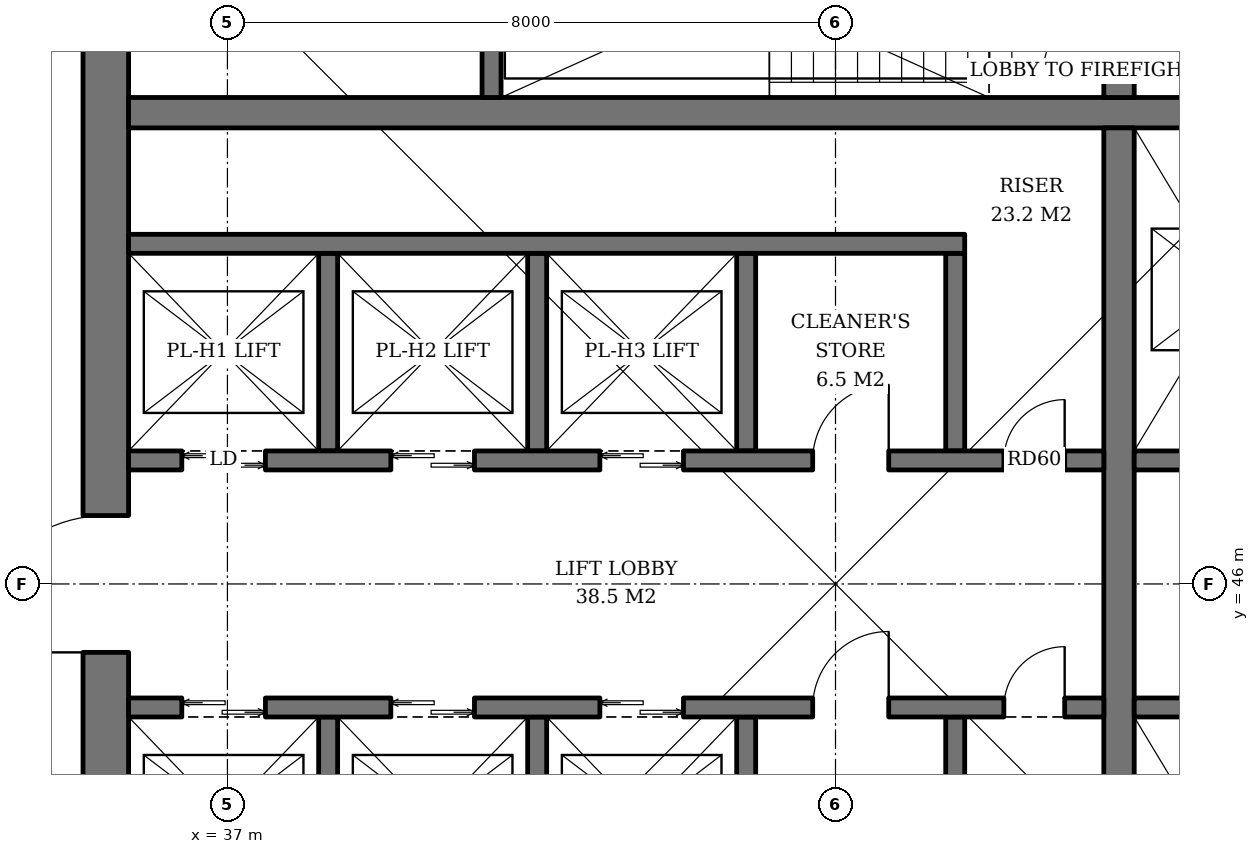
"""IFC4 building model, lengths in metres.
Left out: names, types, materials, properties, quantities, classifications, styles, units other than length and angle.
Written with IfcOpenShell. Run it as: python <this file> out.ifc"""

import sys

from ifc_helpers import new_model, si_unit, direction, frame, frame_2d, origin, place, context, subcontext, project, spatial, rectangle, extrude, element, fill, save


model = new_model("IFC4")
c1 = context("Model", 3, precision=1e-05, world=origin(), true_north=direction((0.0, 1.0)))
c2 = subcontext(c1, "Body", "Model", "MODEL_VIEW")
j1 = project(units=[si_unit("LENGTHUNIT", "METRE"), si_unit("PLANEANGLEUNIT", "RADIAN")], contexts=[c1])
p1 = place(None, origin())
s1 = spatial("IfcSite", under=j1, at=p1, CompositionType="ELEMENT")
p2 = place(p1, origin())
s2 = spatial("IfcBuilding", under=s1, at=p2, CompositionType="ELEMENT")
p3 = place(p2, frame((0.0, 0.0, 165.4)))
s3 = spatial("IfcBuildingStorey", under=s2, at=p3, CompositionType="ELEMENT", Elevation=165.4)
p4 = place(p3, frame((35.4, 36.7, 0.0), z_axis=(0.0, 0.0, 1.0), x_axis=(0.0, 1.0, 0.0)))
e1 = element("IfcWall", 1, at=p4, inside=s3, PredefinedType="SHEAR", context=c2, shape_type="SweptSolid", body=[
    extrude(rectangle(XDim=18.6, YDim=0.6, at=frame_2d((9.3, 0.0))), origin(), (0.0, 0.0, 1.0), 3.8),
])
p5 = place(p4, frame((8.4, 0.0, 0.0)))
e2 = element("IfcOpeningElement", 2, at=p5, cuts=e1, PredefinedType="OPENING", context=c2, shape_type="SweptSolid", body=[
    extrude(rectangle(XDim=1.8, YDim=2.4, at=frame_2d((0.9, 1.2))), frame((0.0, 0.31, 0.0), z_axis=(0.0, -1.0, 0.0), x_axis=(1.0, 0.0, 0.0)), (0.0, 0.0, 1.0), 0.62),
])
p6 = place(p3, frame((35.7, 52.2, 0.0), z_axis=(0.0, 0.0, 1.0), x_axis=(1.0, 0.0, 0.0)))
e3 = element("IfcWall", 3, at=p6, inside=s3, PredefinedType="SHEAR", context=c2, shape_type="SweptSolid", body=[
    extrude(rectangle(XDim=18.6, YDim=0.4, at=frame_2d((9.3, 0.0))), origin(), (0.0, 0.0, 1.0), 3.8),
])
p7 = place(p3, frame((48.73, 40.0, 0.0), z_axis=(0.0, 0.0, 1.0), x_axis=(0.0, 1.0, 0.0)))
e4 = element("IfcWall", 4, at=p7, inside=s3, PredefinedType="SHEAR", context=c2, shape_type="SweptSolid", body=[
    extrude(rectangle(XDim=12.0, YDim=0.4, at=frame_2d((6.0, 0.0))), origin(), (0.0, 0.0, 1.0), 3.8),
])
p8 = place(p3, frame((48.73, 52.4, 0.0), z_axis=(0.0, 0.0, 1.0), x_axis=(0.0, 1.0, 0.0)))
e5 = element("IfcWall", 5, at=p8, inside=s3, PredefinedType="SHEAR", context=c2, shape_type="SweptSolid", body=[
    extrude(rectangle(XDim=2.9, YDim=0.4, at=frame_2d((1.45, 0.0))), origin(), (0.0, 0.0, 1.0), 3.8),
])
p9 = place(p8, frame((0.3, 0.0, 0.0)))
e6 = element("IfcOpeningElement", 6, at=p9, cuts=e5, PredefinedType="OPENING", context=c2, shape_type="SweptSolid", body=[
    extrude(rectangle(XDim=1.0, YDim=2.1, at=frame_2d((0.5, 1.05))), frame((0.0, 0.21, 0.0), z_axis=(0.0, -1.0, 0.0), x_axis=(1.0, 0.0, 0.0)), (0.0, 0.0, 1.0), 0.42),
])
p10 = place(p3, frame((40.475, 52.4, 0.0), z_axis=(0.0, 0.0, 1.0), x_axis=(0.0, 1.0, 0.0)))
e7 = element("IfcWall", 7, at=p10, inside=s3, PredefinedType="SHEAR", context=c2, shape_type="SweptSolid", body=[
    extrude(rectangle(XDim=2.9, YDim=0.25, at=frame_2d((1.45, 0.0))), origin(), (0.0, 0.0, 1.0), 3.8),
])
for number, where, z_axis, x_axis in (
    (8, (38.325, 47.75, 0.0), (0.0, 0.0, 1.0), (0.0, 1.0, 0.0)),
    (9, (41.075, 47.75, 0.0), (0.0, 0.0, 1.0), (0.0, 1.0, 0.0)),
    (10, (43.825, 47.75, 0.0), (0.0, 0.0, 1.0), (0.0, 1.0, 0.0)),
    (11, (46.575, 47.75, 0.0), (0.0, 0.0, 1.0), (0.0, 1.0, 0.0)),
):
    element("IfcWall", number, at=place(p3, frame(where, z_axis=z_axis, x_axis=x_axis)), inside=s3, PredefinedType="SHEAR", context=c2, shape_type="SweptSolid", body=[
        extrude(rectangle(XDim=2.6, YDim=0.25, at=frame_2d((1.3, 0.0))), origin(), (0.0, 0.0, 1.0), 3.8),
    ])
p11 = place(p3, frame((35.7, 50.475, 0.0), z_axis=(0.0, 0.0, 1.0), x_axis=(1.0, 0.0, 0.0)))
e12 = element("IfcWall", 12, at=p11, inside=s3, PredefinedType="SHEAR", context=c2, shape_type="SweptSolid", body=[
    extrude(rectangle(XDim=11.0, YDim=0.25, at=frame_2d((5.5, 0.0))), origin(), (0.0, 0.0, 1.0), 3.8),
])
p12 = place(p3, frame((35.7, 47.625, 0.0), z_axis=(0.0, 0.0, 1.0), x_axis=(1.0, 0.0, 0.0)))
e13 = element("IfcWall", 13, at=p12, inside=s3, PredefinedType="SHEAR", context=c2, shape_type="SweptSolid", body=[
    extrude(rectangle(XDim=12.83, YDim=0.25, at=frame_2d((6.415, 0.0))), origin(), (0.0, 0.0, 1.0), 3.8),
])
p13 = place(p12, frame((0.7, 0.0, 0.0)))
e14 = element("IfcOpeningElement", 14, at=p13, cuts=e13, PredefinedType="OPENING", context=c2, shape_type="SweptSolid", body=[
    extrude(rectangle(XDim=1.1, YDim=2.2, at=frame_2d((0.55, 1.1))), frame((0.0, 0.135, 0.0), z_axis=(0.0, -1.0, 0.0), x_axis=(1.0, 0.0, 0.0)), (0.0, 0.0, 1.0), 0.27),
])
p14 = place(p12, frame((3.45, 0.0, 0.0)))
e15 = element("IfcOpeningElement", 15, at=p14, cuts=e13, PredefinedType="OPENING", context=c2, shape_type="SweptSolid", body=[
    extrude(rectangle(XDim=1.1, YDim=2.2, at=frame_2d((0.55, 1.1))), frame((0.0, 0.135, 0.0), z_axis=(0.0, -1.0, 0.0), x_axis=(1.0, 0.0, 0.0)), (0.0, 0.0, 1.0), 0.27),
])
p15 = place(p12, frame((6.2, 0.0, 0.0)))
e16 = element("IfcOpeningElement", 16, at=p15, cuts=e13, PredefinedType="OPENING", context=c2, shape_type="SweptSolid", body=[
    extrude(rectangle(XDim=1.1, YDim=2.2, at=frame_2d((0.55, 1.1))), frame((0.0, 0.135, 0.0), z_axis=(0.0, -1.0, 0.0), x_axis=(1.0, 0.0, 0.0)), (0.0, 0.0, 1.0), 0.27),
])
p16 = place(p12, frame((9.0, 0.0, 0.0)))
e17 = element("IfcOpeningElement", 17, at=p16, cuts=e13, PredefinedType="OPENING", context=c2, shape_type="SweptSolid", body=[
    extrude(rectangle(XDim=1.0, YDim=2.1, at=frame_2d((0.5, 1.05))), frame((0.0, 0.135, 0.0), z_axis=(0.0, -1.0, 0.0), x_axis=(1.0, 0.0, 0.0)), (0.0, 0.0, 1.0), 0.27),
])
p17 = place(p12, frame((11.515, 0.0, 0.0)))
e18 = element("IfcOpeningElement", 18, at=p17, cuts=e13, PredefinedType="OPENING", context=c2, shape_type="SweptSolid", body=[
    extrude(rectangle(XDim=0.8, YDim=2.0, at=frame_2d((0.4, 1.0))), frame((0.0, 0.135, 0.0), z_axis=(0.0, -1.0, 0.0), x_axis=(1.0, 0.0, 0.0)), (0.0, 0.0, 1.0), 0.27),
])
for number, where, z_axis, x_axis in (
    (19, (38.325, 44.25, 0.0), (0.0, 0.0, 1.0), (0.0, -1.0, 0.0)),
    (20, (41.075, 44.25, 0.0), (0.0, 0.0, 1.0), (0.0, -1.0, 0.0)),
    (21, (43.825, 44.25, 0.0), (0.0, 0.0, 1.0), (0.0, -1.0, 0.0)),
    (22, (46.575, 44.25, 0.0), (0.0, 0.0, 1.0), (0.0, -1.0, 0.0)),
):
    element("IfcWall", number, at=place(p3, frame(where, z_axis=z_axis, x_axis=x_axis)), inside=s3, PredefinedType="SHEAR", context=c2, shape_type="SweptSolid", body=[
        extrude(rectangle(XDim=2.6, YDim=0.25, at=frame_2d((1.3, 0.0))), origin(), (0.0, 0.0, 1.0), 3.8),
    ])
p18 = place(p3, frame((35.7, 44.375, 0.0), z_axis=(0.0, 0.0, 1.0), x_axis=(1.0, 0.0, 0.0)))
e23 = element("IfcWall", 23, at=p18, inside=s3, PredefinedType="SHEAR", context=c2, shape_type="SweptSolid", body=[
    extrude(rectangle(XDim=12.83, YDim=0.25, at=frame_2d((6.415, 0.0))), origin(), (0.0, 0.0, 1.0), 3.8),
])
p19 = place(p18, frame((0.7, 0.0, 0.0)))
e24 = element("IfcOpeningElement", 24, at=p19, cuts=e23, PredefinedType="OPENING", context=c2, shape_type="SweptSolid", body=[
    extrude(rectangle(XDim=1.1, YDim=2.2, at=frame_2d((0.55, 1.1))), frame((0.0, 0.135, 0.0), z_axis=(0.0, -1.0, 0.0), x_axis=(1.0, 0.0, 0.0)), (0.0, 0.0, 1.0), 0.27),
])
p20 = place(p18, frame((3.45, 0.0, 0.0)))
e25 = element("IfcOpeningElement", 25, at=p20, cuts=e23, PredefinedType="OPENING", context=c2, shape_type="SweptSolid", body=[
    extrude(rectangle(XDim=1.1, YDim=2.2, at=frame_2d((0.55, 1.1))), frame((0.0, 0.135, 0.0), z_axis=(0.0, -1.0, 0.0), x_axis=(1.0, 0.0, 0.0)), (0.0, 0.0, 1.0), 0.27),
])
p21 = place(p18, frame((6.2, 0.0, 0.0)))
e26 = element("IfcOpeningElement", 26, at=p21, cuts=e23, PredefinedType="OPENING", context=c2, shape_type="SweptSolid", body=[
    extrude(rectangle(XDim=1.1, YDim=2.2, at=frame_2d((0.55, 1.1))), frame((0.0, 0.135, 0.0), z_axis=(0.0, -1.0, 0.0), x_axis=(1.0, 0.0, 0.0)), (0.0, 0.0, 1.0), 0.27),
])
p22 = place(p18, frame((9.0, 0.0, 0.0)))
e27 = element("IfcOpeningElement", 27, at=p22, cuts=e23, PredefinedType="OPENING", context=c2, shape_type="SweptSolid", body=[
    extrude(rectangle(XDim=1.0, YDim=2.1, at=frame_2d((0.5, 1.05))), frame((0.0, 0.135, 0.0), z_axis=(0.0, -1.0, 0.0), x_axis=(1.0, 0.0, 0.0)), (0.0, 0.0, 1.0), 0.27),
])
p23 = place(p18, frame((11.515, 0.0, 0.0)))
e28 = element("IfcOpeningElement", 28, at=p23, cuts=e23, PredefinedType="OPENING", context=c2, shape_type="SweptSolid", body=[
    extrude(rectangle(XDim=0.8, YDim=2.0, at=frame_2d((0.4, 1.0))), frame((0.0, 0.135, 0.0), z_axis=(0.0, -1.0, 0.0), x_axis=(1.0, 0.0, 0.0)), (0.0, 0.0, 1.0), 0.27),
])
p24 = place(p3, frame((48.93, 47.625, 0.0), z_axis=(0.0, 0.0, 1.0), x_axis=(1.0, 0.0, 0.0)))
e29 = element("IfcWall", 29, at=p24, inside=s3, PredefinedType="SHEAR", context=c2, shape_type="SweptSolid", body=[
    extrude(rectangle(XDim=5.37, YDim=0.25, at=frame_2d((2.685, 0.0))), origin(), (0.0, 0.0, 1.0), 3.8),
])
p25 = place(p24, frame((0.63, 0.0, 0.0)))
e30 = element("IfcOpeningElement", 30, at=p25, cuts=e29, PredefinedType="OPENING", context=c2, shape_type="SweptSolid", body=[
    extrude(rectangle(XDim=1.3, YDim=2.2, at=frame_2d((0.65, 1.1))), frame((0.0, 0.135, 0.0), z_axis=(0.0, -1.0, 0.0), x_axis=(1.0, 0.0, 0.0)), (0.0, 0.0, 1.0), 0.27),
])
p26 = place(p24, frame((3.44, 0.0, 0.0)))
e31 = element("IfcOpeningElement", 31, at=p26, cuts=e29, PredefinedType="OPENING", context=c2, shape_type="SweptSolid", body=[
    extrude(rectangle(XDim=1.3, YDim=2.2, at=frame_2d((0.65, 1.1))), frame((0.0, 0.135, 0.0), z_axis=(0.0, -1.0, 0.0), x_axis=(1.0, 0.0, 0.0)), (0.0, 0.0, 1.0), 0.27),
])
p27 = place(p3, frame((48.93, 44.375, 0.0), z_axis=(0.0, 0.0, 1.0), x_axis=(1.0, 0.0, 0.0)))
e32 = element("IfcWall", 32, at=p27, inside=s3, PredefinedType="SHEAR", context=c2, shape_type="SweptSolid", body=[
    extrude(rectangle(XDim=5.37, YDim=0.25, at=frame_2d((2.685, 0.0))), origin(), (0.0, 0.0, 1.0), 3.8),
])
p28 = place(p27, frame((0.63, 0.0, 0.0)))
e33 = element("IfcOpeningElement", 33, at=p28, cuts=e32, PredefinedType="OPENING", context=c2, shape_type="SweptSolid", body=[
    extrude(rectangle(XDim=1.3, YDim=2.2, at=frame_2d((0.65, 1.1))), frame((0.0, 0.135, 0.0), z_axis=(0.0, -1.0, 0.0), x_axis=(1.0, 0.0, 0.0)), (0.0, 0.0, 1.0), 0.27),
])
p29 = place(p27, frame((3.44, 0.0, 0.0)))
e34 = element("IfcOpeningElement", 34, at=p29, cuts=e32, PredefinedType="OPENING", context=c2, shape_type="SweptSolid", body=[
    extrude(rectangle(XDim=1.3, YDim=2.2, at=frame_2d((0.65, 1.1))), frame((0.0, 0.135, 0.0), z_axis=(0.0, -1.0, 0.0), x_axis=(1.0, 0.0, 0.0)), (0.0, 0.0, 1.0), 0.27),
])
p30 = place(p13, origin())
e35 = element("IfcDoor", 35, at=p30, inside=s3, OperationType="DOUBLE_DOOR_SLIDING", PredefinedType="DOOR", context=c2, shape_type="SweptSolid", body=[
    extrude(rectangle(XDim=1.1, YDim=2.2, at=frame_2d((0.55, 1.1))), frame((0.0, 0.025, 0.0), z_axis=(0.0, -1.0, 0.0), x_axis=(1.0, 0.0, 0.0)), (0.0, 0.0, 1.0), 0.05),
])
fill(e14, e35)
p31 = place(p14, origin())
e36 = element("IfcDoor", 36, at=p31, inside=s3, OperationType="DOUBLE_DOOR_SLIDING", PredefinedType="DOOR", context=c2, shape_type="SweptSolid", body=[
    extrude(rectangle(XDim=1.1, YDim=2.2, at=frame_2d((0.55, 1.1))), frame((0.0, 0.025, 0.0), z_axis=(0.0, -1.0, 0.0), x_axis=(1.0, 0.0, 0.0)), (0.0, 0.0, 1.0), 0.05),
])
fill(e15, e36)
p32 = place(p15, origin())
e37 = element("IfcDoor", 37, at=p32, inside=s3, OperationType="DOUBLE_DOOR_SLIDING", PredefinedType="DOOR", context=c2, shape_type="SweptSolid", body=[
    extrude(rectangle(XDim=1.1, YDim=2.2, at=frame_2d((0.55, 1.1))), frame((0.0, 0.025, 0.0), z_axis=(0.0, -1.0, 0.0), x_axis=(1.0, 0.0, 0.0)), (0.0, 0.0, 1.0), 0.05),
])
fill(e16, e37)
p33 = place(p16, origin())
e38 = element("IfcDoor", 38, at=p33, inside=s3, OperationType="SINGLE_SWING_RIGHT", PredefinedType="DOOR", context=c2, shape_type="SweptSolid", body=[
    extrude(rectangle(XDim=1.0, YDim=2.1, at=frame_2d((0.5, 1.05))), frame((0.0, 0.025, 0.0), z_axis=(0.0, -1.0, 0.0), x_axis=(1.0, 0.0, 0.0)), (0.0, 0.0, 1.0), 0.05),
])
fill(e17, e38)
p34 = place(p17, origin())
e39 = element("IfcDoor", 39, at=p34, inside=s3, OperationType="SINGLE_SWING_RIGHT", PredefinedType="DOOR", context=c2, shape_type="SweptSolid", body=[
    extrude(rectangle(XDim=0.8, YDim=2.0, at=frame_2d((0.4, 1.0))), frame((0.0, 0.025, 0.0), z_axis=(0.0, -1.0, 0.0), x_axis=(1.0, 0.0, 0.0)), (0.0, 0.0, 1.0), 0.05),
])
fill(e18, e39)
p35 = place(p19, origin())
e40 = element("IfcDoor", 40, at=p35, inside=s3, OperationType="DOUBLE_DOOR_SLIDING", PredefinedType="DOOR", context=c2, shape_type="SweptSolid", body=[
    extrude(rectangle(XDim=1.1, YDim=2.2, at=frame_2d((0.55, 1.1))), frame((0.0, 0.025, 0.0), z_axis=(0.0, -1.0, 0.0), x_axis=(1.0, 0.0, 0.0)), (0.0, 0.0, 1.0), 0.05),
])
fill(e24, e40)
p36 = place(p20, origin())
e41 = element("IfcDoor", 41, at=p36, inside=s3, OperationType="DOUBLE_DOOR_SLIDING", PredefinedType="DOOR", context=c2, shape_type="SweptSolid", body=[
    extrude(rectangle(XDim=1.1, YDim=2.2, at=frame_2d((0.55, 1.1))), frame((0.0, 0.025, 0.0), z_axis=(0.0, -1.0, 0.0), x_axis=(1.0, 0.0, 0.0)), (0.0, 0.0, 1.0), 0.05),
])
fill(e25, e41)
p37 = place(p21, origin())
e42 = element("IfcDoor", 42, at=p37, inside=s3, OperationType="DOUBLE_DOOR_SLIDING", PredefinedType="DOOR", context=c2, shape_type="SweptSolid", body=[
    extrude(rectangle(XDim=1.1, YDim=2.2, at=frame_2d((0.55, 1.1))), frame((0.0, 0.025, 0.0), z_axis=(0.0, -1.0, 0.0), x_axis=(1.0, 0.0, 0.0)), (0.0, 0.0, 1.0), 0.05),
])
fill(e26, e42)
p38 = place(p22, origin())
e43 = element("IfcDoor", 43, at=p38, inside=s3, OperationType="SINGLE_SWING_RIGHT", PredefinedType="DOOR", context=c2, shape_type="SweptSolid", body=[
    extrude(rectangle(XDim=1.0, YDim=2.1, at=frame_2d((0.5, 1.05))), frame((0.0, 0.025, 0.0), z_axis=(0.0, -1.0, 0.0), x_axis=(1.0, 0.0, 0.0)), (0.0, 0.0, 1.0), 0.05),
])
fill(e27, e43)
p39 = place(p23, origin())
e44 = element("IfcDoor", 44, at=p39, inside=s3, OperationType="SINGLE_SWING_RIGHT", PredefinedType="DOOR", context=c2, shape_type="SweptSolid", body=[
    extrude(rectangle(XDim=0.8, YDim=2.0, at=frame_2d((0.4, 1.0))), frame((0.0, 0.025, 0.0), z_axis=(0.0, -1.0, 0.0), x_axis=(1.0, 0.0, 0.0)), (0.0, 0.0, 1.0), 0.05),
])
fill(e28, e44)
p40 = place(p9, origin())
e45 = element("IfcDoor", 45, at=p40, inside=s3, OperationType="SINGLE_SWING_LEFT", PredefinedType="DOOR", context=c2, shape_type="SweptSolid", body=[
    extrude(rectangle(XDim=1.0, YDim=2.1, at=frame_2d((0.5, 1.05))), frame((0.0, 0.025, 0.0), z_axis=(0.0, -1.0, 0.0), x_axis=(1.0, 0.0, 0.0)), (0.0, 0.0, 1.0), 0.05),
])
fill(e6, e45)
p41 = place(p5, origin())
e46 = element("IfcDoor", 46, at=p41, inside=s3, OperationType="DOUBLE_DOOR_SINGLE_SWING", PredefinedType="DOOR", context=c2, shape_type="SweptSolid", body=[
    extrude(rectangle(XDim=1.8, YDim=2.4, at=frame_2d((0.9, 1.2))), frame((0.0, 0.025, 0.0), z_axis=(0.0, -1.0, 0.0), x_axis=(1.0, 0.0, 0.0)), (0.0, 0.0, 1.0), 0.05),
])
fill(e2, e46)
save(model, sys.argv[1])
